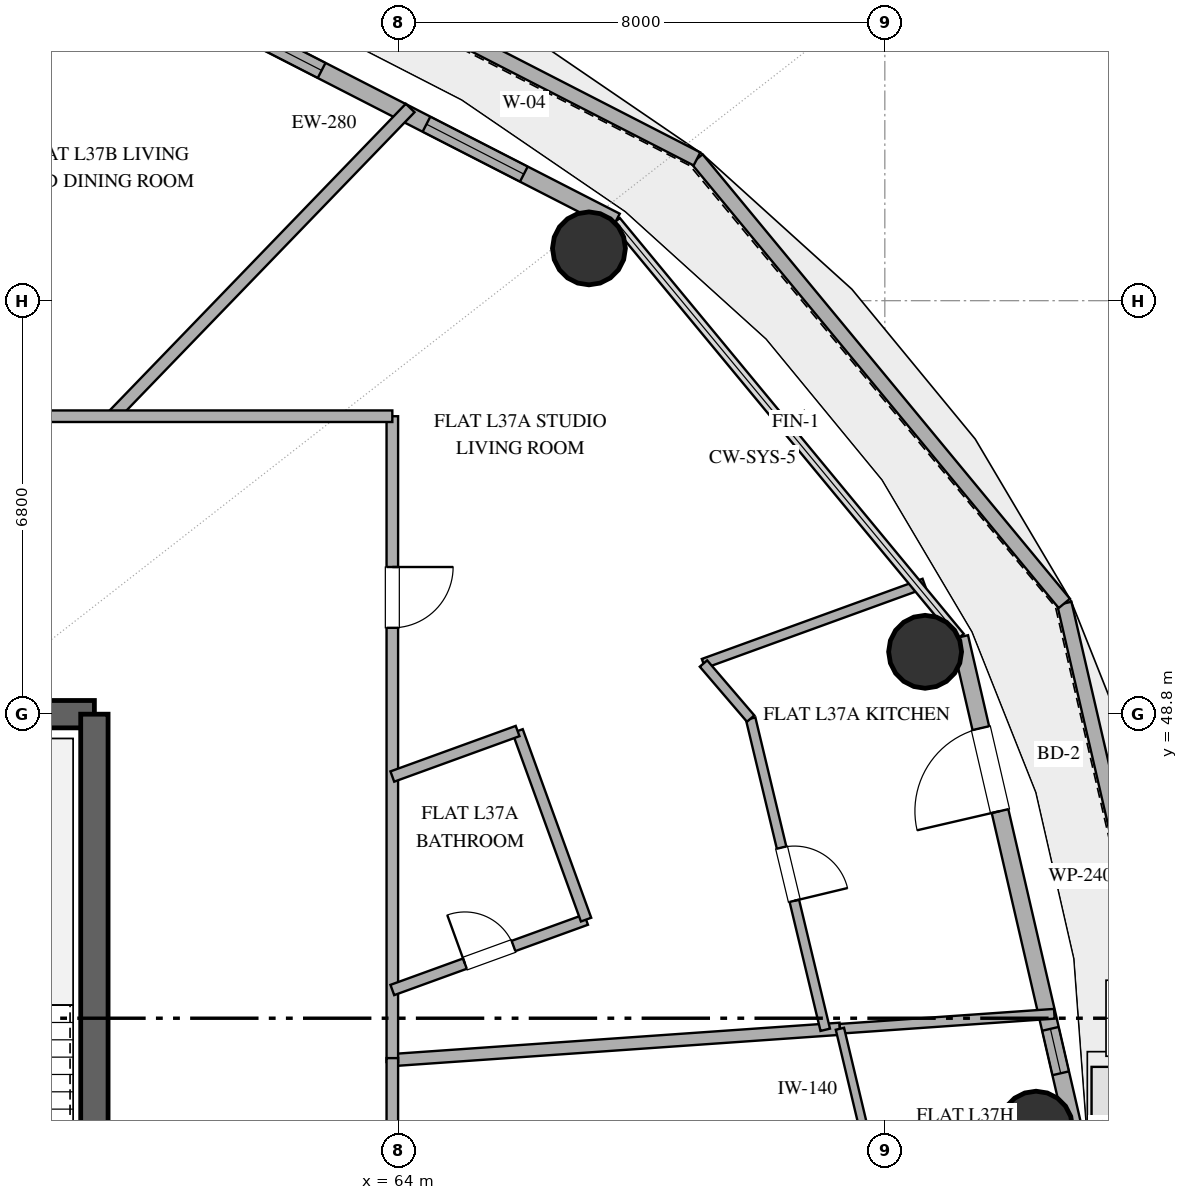
"""IFC4 building model, lengths in metres.
Left out: names, types, materials, properties, quantities, classifications, styles, units other than length and angle.
Written with IfcOpenShell. Run it as: python <this file> out.ifc"""

import sys

from ifc_helpers import new_model, si_unit, direction, frame, frame_2d, origin, origin_2d, place, context, subcontext, project, spatial, rectangle, hollow_circle, extrude, element, fill, save


model = new_model("IFC4")
c1 = context("Model", 3, precision=1e-05, world=origin(), true_north=direction((0.0, 1.0)))
c2 = subcontext(c1, "Body", "Model", "MODEL_VIEW")
j1 = project(units=[si_unit("LENGTHUNIT", "METRE"), si_unit("PLANEANGLEUNIT", "RADIAN")], contexts=[c1])
p1 = place(None, origin())
s1 = spatial("IfcSite", under=j1, at=p1, CompositionType="ELEMENT")
p2 = place(p1, origin())
s2 = spatial("IfcBuilding", under=s1, at=p2, CompositionType="ELEMENT")
p3 = place(p2, frame((0.0, 0.0, 150.6)))
s3 = spatial("IfcBuildingStorey", under=s2, at=p3, CompositionType="ELEMENT", Elevation=150.6)
p4 = place(p3, frame((55.0, 48.8, 0.0), z_axis=(0.0, 0.0, 1.0), x_axis=(1.0, 0.0, 0.0)))
e1 = element("IfcWall", 1, at=p4, inside=s3, PredefinedType="SHEAR", context=c2, shape_type="SweptSolid", body=[
    extrude(rectangle(XDim=4.0, YDim=0.45, at=frame_2d((2.0, 0.0))), origin(), (0.0, 0.0, 1.0), 3.38),
])
p5 = place(p3, frame((59.0, 35.2, 0.0), z_axis=(0.0, 0.0, 1.0), x_axis=(0.0, 1.0, 0.0)))
e2 = element("IfcWall", 2, at=p5, inside=s3, PredefinedType="SHEAR", context=c2, shape_type="SweptSolid", body=[
    extrude(rectangle(XDim=13.6, YDim=0.45, at=frame_2d((6.8, 0.0))), origin(), (0.0, 0.0, 1.0), 3.38),
])
for number, where, z_axis, x_axis in (
    (3, (74.487, 42.0, 0.0), (0.0, 0.0, 1.0), (1.0, 0.0, 0.0)),
    (4, (72.662, 49.826, 0.0), (0.0, 0.0, 1.0), (1.0, 0.0, 0.0)),
    (5, (67.134, 56.46, 0.0), (0.0, 0.0, 1.0), (1.0, 0.0, 0.0)),
):
    element("IfcColumn", number, at=place(p3, frame(where, z_axis=z_axis, x_axis=x_axis)), inside=s3, PredefinedType="COLUMN", context=c2, shape_type="SweptSolid", body=[
        extrude(hollow_circle(Radius=0.6, WallThickness=0.032, at=origin_2d()), origin(), (0.0, 0.0, 1.0), 3.38),
    ])
p6 = place(p3, frame((76.946, 42.0, 0.0), z_axis=(0.0, 0.0, 1.0), x_axis=(-0.225341034137, 0.974279948646, 0.0)))
e6 = element("IfcWall", 6, at=p6, inside=s3, PredefinedType="PARAPET", context=c2, shape_type="SweptSolid", body=[
    extrude(rectangle(XDim=8.849, YDim=0.24, at=frame_2d((4.425, 0.0))), origin(), (0.0, 0.0, 1.0), 1.25),
])
p7 = place(p3, frame((74.952, 50.622, 0.0), z_axis=(0.0, 0.0, 1.0), x_axis=(-0.637107627078, 0.770774851379, 0.0)))
e7 = element("IfcWall", 7, at=p7, inside=s3, PredefinedType="PARAPET", context=c2, shape_type="SweptSolid", body=[
    extrude(rectangle(XDim=9.483, YDim=0.24, at=frame_2d((4.742, 0.0))), origin(), (0.0, 0.0, 1.0), 1.25),
])
p8 = place(p3, frame((68.91, 57.931, 0.0), z_axis=(0.0, 0.0, 1.0), x_axis=(-0.8897661473, 0.456416698992, 0.0)))
e8 = element("IfcWall", 8, at=p8, inside=s3, PredefinedType="PARAPET", context=c2, shape_type="SweptSolid", body=[
    extrude(rectangle(XDim=10.7, YDim=0.24, at=frame_2d((5.35, 0.0))), origin(), (0.0, 0.0, 1.0), 1.25),
])
p9 = place(p3, frame((75.099, 42.0, 0.0), z_axis=(0.0, 0.0, 1.0), x_axis=(-0.225473184558, 0.974249374157, 0.0)))
e9 = element("IfcWall", 9, at=p9, inside=s3, PredefinedType="SOLIDWALL", context=c2, shape_type="SweptSolid", body=[
    extrude(rectangle(XDim=8.28, YDim=0.28, at=frame_2d((4.14, 0.0))), origin(), (0.0, 0.0, 1.0), 3.38),
])
p10 = place(p9, frame((5.344, 0.0, 0.0)))
e10 = element("IfcOpeningElement", 10, at=p10, cuts=e9, PredefinedType="OPENING", context=c2, shape_type="SweptSolid", body=[
    extrude(rectangle(XDim=1.4, YDim=2.2, at=frame_2d((0.7, 1.1))), frame((0.0, 0.15, 0.0), z_axis=(0.0, -1.0, 0.0), x_axis=(1.0, 0.0, 0.0)), (0.0, 0.0, 1.0), 0.3),
])
p11 = place(p9, frame((0.918, 0.0, 0.85)))
e11 = element("IfcOpeningElement", 11, at=p11, cuts=e9, PredefinedType="OPENING", context=c2, shape_type="SweptSolid", body=[
    extrude(rectangle(XDim=0.75, YDim=1.8, at=frame_2d((0.375, 0.9))), frame((0.0, 0.15, 0.0), z_axis=(0.0, -1.0, 0.0), x_axis=(1.0, 0.0, 0.0)), (0.0, 0.0, 1.0), 0.3),
])
p12 = place(p3, frame((67.576, 56.906, 0.0), z_axis=(0.0, 0.0, 1.0), x_axis=(-0.889872523182, 0.456209263919, 0.0)))
e12 = element("IfcWall", 12, at=p12, inside=s3, PredefinedType="SOLIDWALL", context=c2, shape_type="SweptSolid", body=[
    extrude(rectangle(XDim=10.016, YDim=0.28, at=frame_2d((5.008, 0.0))), origin(), (0.0, 0.0, 1.0), 3.38),
])
p13 = place(p12, frame((1.7, 0.0, 0.85)))
e13 = element("IfcOpeningElement", 13, at=p13, cuts=e12, PredefinedType="OPENING", context=c2, shape_type="SweptSolid", body=[
    extrude(rectangle(XDim=1.8, YDim=2.2, at=frame_2d((0.9, 1.1))), frame((0.0, 0.15, 0.0), z_axis=(0.0, -1.0, 0.0), x_axis=(1.0, 0.0, 0.0)), (0.0, 0.0, 1.0), 0.3),
])
p14 = place(p12, frame((5.438, 0.0, 0.85)))
e14 = element("IfcOpeningElement", 14, at=p14, cuts=e12, PredefinedType="OPENING", context=c2, shape_type="SweptSolid", body=[
    extrude(rectangle(XDim=1.8, YDim=2.2, at=frame_2d((0.9, 1.1))), frame((0.0, 0.15, 0.0), z_axis=(0.0, -1.0, 0.0), x_axis=(1.0, 0.0, 0.0)), (0.0, 0.0, 1.0), 0.3),
])
p15 = place(p3, frame((71.261, 43.627, 0.0), z_axis=(0.0, 0.0, 1.0), x_axis=(-0.997562906323, -0.069772830877, 0.0)))
e15 = element("IfcWall", 15, at=p15, inside=s3, PredefinedType="PARTITIONING", context=c2, shape_type="SweptSolid", body=[
    extrude(rectangle(XDim=7.38, YDim=0.2, at=frame_2d((3.69, 0.0))), origin(), (0.0, 0.0, 1.0), 2.74),
])
p16 = place(p3, frame((64.194, 58.769, 0.0), z_axis=(0.0, 0.0, 1.0), x_axis=(-0.694647685064, -0.719350118952, 0.0)))
e16 = element("IfcWall", 16, at=p16, inside=s3, PredefinedType="PARTITIONING", context=c2, shape_type="SweptSolid", body=[
    extrude(rectangle(XDim=7.047, YDim=0.2, at=frame_2d((3.523, 0.0))), origin(), (0.0, 0.0, 1.0), 2.74),
])
p17 = place(p3, frame((63.9, 53.7, 0.0), z_axis=(0.0, 0.0, 1.0), x_axis=(0.0, -1.0, 0.0)))
e17 = element("IfcWall", 17, at=p17, inside=s3, PredefinedType="PARTITIONING", context=c2, shape_type="SweptSolid", body=[
    extrude(rectangle(XDim=10.62, YDim=0.19, at=frame_2d((5.31, 0.0))), origin(), (0.0, 0.0, 1.0), 2.74),
])
p18 = place(p17, frame((2.48, 0.0, 0.0)))
e18 = element("IfcOpeningElement", 18, at=p18, cuts=e17, PredefinedType="OPENING", context=c2, shape_type="SweptSolid", body=[
    extrude(rectangle(XDim=1.0, YDim=2.2, at=frame_2d((0.5, 1.1))), frame((0.0, 0.105, 0.0), z_axis=(0.0, -1.0, 0.0), x_axis=(1.0, 0.0, 0.0)), (0.0, 0.0, 1.0), 0.21),
])
p19 = place(p3, frame((49.612, 53.7, 0.0), z_axis=(0.0, 0.0, 1.0), x_axis=(1.0, 0.0, 0.0)))
e19 = element("IfcWall", 19, at=p19, inside=s3, PredefinedType="PARTITIONING", context=c2, shape_type="SweptSolid", body=[
    extrude(rectangle(XDim=14.288, YDim=0.19, at=frame_2d((7.144, 0.0))), origin(), (0.0, 0.0, 1.0), 2.74),
])
p20 = place(p19, frame((6.395, 0.0, 0.0)))
e20 = element("IfcOpeningElement", 20, at=p20, cuts=e19, PredefinedType="OPENING", context=c2, shape_type="SweptSolid", body=[
    extrude(rectangle(XDim=1.0, YDim=2.2, at=frame_2d((0.5, 1.1))), frame((0.0, 0.105, 0.0), z_axis=(0.0, -1.0, 0.0), x_axis=(1.0, 0.0, 0.0)), (0.0, 0.0, 1.0), 0.21),
])
p21 = place(p3, frame((63.9, 43.144, 0.0), z_axis=(0.0, 0.0, 1.0), x_axis=(0.0, -1.0, 0.0)))
e21 = element("IfcWall", 21, at=p21, inside=s3, PredefinedType="PARTITIONING", context=c2, shape_type="SweptSolid", body=[
    extrude(rectangle(XDim=12.844, YDim=0.19, at=frame_2d((6.422, 0.0))), origin(), (0.0, 0.0, 1.0), 2.74),
])
p22 = place(p21, frame((9.529, 0.0, 0.0)))
e22 = element("IfcOpeningElement", 22, at=p22, cuts=e21, PredefinedType="OPENING", context=c2, shape_type="SweptSolid", body=[
    extrude(rectangle(XDim=1.0, YDim=2.2, at=frame_2d((0.5, 1.1))), frame((0.0, 0.105, 0.0), z_axis=(0.0, -1.0, 0.0), x_axis=(1.0, 0.0, 0.0)), (0.0, 0.0, 1.0), 0.21),
])
p23 = place(p3, frame((69.793, 48.728, 0.0), z_axis=(0.0, 0.0, 1.0), x_axis=(0.23310450522, -0.972451690135, 0.0)))
e23 = element("IfcWall", 23, at=p23, inside=s3, PredefinedType="PLUMBINGWALL", context=c2, shape_type="SweptSolid", body=[
    extrude(rectangle(XDim=5.263, YDim=0.16, at=frame_2d((2.631, 0.0))), origin(), (0.0, 0.0, 1.0), 2.74),
])
p24 = place(p23, frame((2.181, 0.0, 0.0)))
e24 = element("IfcOpeningElement", 24, at=p24, cuts=e23, PredefinedType="OPENING", context=c2, shape_type="SweptSolid", body=[
    extrude(rectangle(XDim=0.9, YDim=2.1, at=frame_2d((0.45, 1.05))), frame((0.0, 0.09, 0.0), z_axis=(0.0, -1.0, 0.0), x_axis=(1.0, 0.0, 0.0)), (0.0, 0.0, 1.0), 0.18),
])
p25 = place(p3, frame((72.647, 50.951, 0.0), z_axis=(0.0, 0.0, 1.0), x_axis=(-0.939926248806, -0.341377572206, 0.0)))
e25 = element("IfcWall", 25, at=p25, inside=s3, PredefinedType="PLUMBINGWALL", context=c2, shape_type="SweptSolid", body=[
    extrude(rectangle(XDim=3.862, YDim=0.16, at=frame_2d((1.931, 0.0))), origin(), (0.0, 0.0, 1.0), 2.74),
])
p26 = place(p3, frame((71.261, 43.627, 0.0), z_axis=(0.0, 0.0, 1.0), x_axis=(0.997563824095, 0.069759707979, 0.0)))
e26 = element("IfcWall", 26, at=p26, inside=s3, PredefinedType="PLUMBINGWALL", context=c2, shape_type="SweptSolid", body=[
    extrude(rectangle(XDim=3.535, YDim=0.16, at=frame_2d((1.767, 0.0))), origin(), (0.0, 0.0, 1.0), 2.74),
])
p27 = place(p3, frame((63.9, 44.264, 0.0), z_axis=(0.0, 0.0, 1.0), x_axis=(0.939936319397, 0.341349843238, 0.0)))
e27 = element("IfcWall", 27, at=p27, inside=s3, PredefinedType="PLUMBINGWALL", context=c2, shape_type="SweptSolid", body=[
    extrude(rectangle(XDim=3.39, YDim=0.18, at=frame_2d((1.695, 0.0))), origin(), (0.0, 0.0, 1.0), 2.74),
])
p28 = place(p27, frame((1.27, 0.0, 0.0)))
e28 = element("IfcOpeningElement", 28, at=p28, cuts=e27, PredefinedType="OPENING", context=c2, shape_type="SweptSolid", body=[
    extrude(rectangle(XDim=0.85, YDim=2.1, at=frame_2d((0.425, 1.05))), frame((0.0, 0.1, 0.0), z_axis=(0.0, -1.0, 0.0), x_axis=(1.0, 0.0, 0.0)), (0.0, 0.0, 1.0), 0.2),
])
p29 = place(p3, frame((67.086, 45.421, 0.0), z_axis=(0.0, 0.0, 1.0), x_axis=(-0.341333094487, 0.93994240175, 0.0)))
e29 = element("IfcWall", 29, at=p29, inside=s3, PredefinedType="PLUMBINGWALL", context=c2, shape_type="SweptSolid", body=[
    extrude(rectangle(XDim=3.3, YDim=0.18, at=frame_2d((1.65, 0.0))), origin(), (0.0, 0.0, 1.0), 2.74),
])
p30 = place(p3, frame((65.96, 48.523, 0.0), z_axis=(0.0, 0.0, 1.0), x_axis=(-0.939962415694, -0.341277976263, 0.0)))
e30 = element("IfcWall", 30, at=p30, inside=s3, PredefinedType="PLUMBINGWALL", context=c2, shape_type="SweptSolid", body=[
    extrude(rectangle(XDim=2.192, YDim=0.18, at=frame_2d((1.096, 0.0))), origin(), (0.0, 0.0, 1.0), 2.74),
])
p31 = place(p3, frame((71.649, 42.0, 0.0), z_axis=(0.0, 0.0, 1.0), x_axis=(-0.231561310927, 0.972820311919, 0.0)))
e31 = element("IfcWall", 31, at=p31, inside=s3, PredefinedType="PARTITIONING", context=c2, shape_type="SweptSolid", body=[
    extrude(rectangle(XDim=1.672, YDim=0.14, at=frame_2d((0.836, 0.0))), origin(), (0.0, 0.0, 1.0), 2.74),
])
p32 = place(p3, frame((69.018, 49.633, 0.0), z_axis=(0.0, 0.0, 1.0), x_axis=(0.650538392346, -0.759473370227, 0.0)))
e32 = element("IfcWall", 32, at=p32, inside=s3, PredefinedType="PLUMBINGWALL", context=c2, shape_type="SweptSolid", body=[
    extrude(rectangle(XDim=1.192, YDim=0.16, at=frame_2d((0.596, 0.0))), origin(), (0.0, 0.0, 1.0), 2.74),
])
p33 = place(p3, origin())
p34 = place(p33, frame((75.95, 42.0, 0.0)))
p35 = place(p34, frame((0.0, 0.0, 0.11)))
e33 = element("IfcDoor", 33, at=p35, inside=s3, OperationType="SINGLE_SWING_LEFT", PredefinedType="TRAPDOOR", context=c2, shape_type="SweptSolid", body=[
    extrude(rectangle(XDim=1.1, YDim=2.0, at=origin_2d()), origin(), (0.0, 0.0, 1.0), 0.05),
])
p36 = place(p10, origin())
e34 = element("IfcDoor", 34, at=p36, inside=s3, OperationType="SINGLE_SWING_LEFT", PredefinedType="DOOR", context=c2, shape_type="SweptSolid", body=[
    extrude(rectangle(XDim=1.4, YDim=2.2, at=frame_2d((0.7, 1.1))), frame((0.0, 0.025, 0.0), z_axis=(0.0, -1.0, 0.0), x_axis=(1.0, 0.0, 0.0)), (0.0, 0.0, 1.0), 0.05),
])
fill(e10, e34)
p37 = place(p13, origin())
e35 = element("IfcWindow", 35, at=p37, inside=s3, PartitioningType="SINGLE_PANEL", PredefinedType="WINDOW", context=c2, shape_type="SweptSolid", body=[
    extrude(rectangle(XDim=1.8, YDim=2.2, at=frame_2d((0.9, 1.1))), frame((0.0, 0.03, 0.0), z_axis=(0.0, -1.0, 0.0), x_axis=(1.0, 0.0, 0.0)), (0.0, 0.0, 1.0), 0.06),
])
fill(e13, e35)
p38 = place(p14, origin())
e36 = element("IfcWindow", 36, at=p38, inside=s3, PartitioningType="SINGLE_PANEL", PredefinedType="WINDOW", context=c2, shape_type="SweptSolid", body=[
    extrude(rectangle(XDim=1.8, YDim=2.2, at=frame_2d((0.9, 1.1))), frame((0.0, 0.03, 0.0), z_axis=(0.0, -1.0, 0.0), x_axis=(1.0, 0.0, 0.0)), (0.0, 0.0, 1.0), 0.06),
])
fill(e14, e36)
p39 = place(p11, origin())
e37 = element("IfcWindow", 37, at=p39, inside=s3, PartitioningType="SINGLE_PANEL", PredefinedType="WINDOW", context=c2, shape_type="SweptSolid", body=[
    extrude(rectangle(XDim=0.75, YDim=1.8, at=frame_2d((0.375, 0.9))), frame((0.0, 0.03, 0.0), z_axis=(0.0, -1.0, 0.0), x_axis=(1.0, 0.0, 0.0)), (0.0, 0.0, 1.0), 0.06),
])
fill(e11, e37)
p40 = place(p18, origin())
e38 = element("IfcDoor", 38, at=p40, inside=s3, OperationType="SINGLE_SWING_LEFT", PredefinedType="DOOR", context=c2, shape_type="SweptSolid", body=[
    extrude(rectangle(XDim=1.0, YDim=2.2, at=frame_2d((0.5, 1.1))), frame((0.0, 0.025, 0.0), z_axis=(0.0, -1.0, 0.0), x_axis=(1.0, 0.0, 0.0)), (0.0, 0.0, 1.0), 0.05),
])
fill(e18, e38)
p41 = place(p24, origin())
e39 = element("IfcDoor", 39, at=p41, inside=s3, OperationType="SINGLE_SWING_RIGHT", PredefinedType="DOOR", context=c2, shape_type="SweptSolid", body=[
    extrude(rectangle(XDim=0.9, YDim=2.1, at=frame_2d((0.45, 1.05))), frame((0.0, 0.025, 0.0), z_axis=(0.0, -1.0, 0.0), x_axis=(1.0, 0.0, 0.0)), (0.0, 0.0, 1.0), 0.05),
])
fill(e24, e39)
p42 = place(p28, origin())
e40 = element("IfcDoor", 40, at=p42, inside=s3, OperationType="SINGLE_SWING_LEFT", PredefinedType="DOOR", context=c2, shape_type="SweptSolid", body=[
    extrude(rectangle(XDim=0.85, YDim=2.1, at=frame_2d((0.425, 1.05))), frame((0.0, 0.025, 0.0), z_axis=(0.0, -1.0, 0.0), x_axis=(1.0, 0.0, 0.0)), (0.0, 0.0, 1.0), 0.05),
])
fill(e28, e40)
save(model, sys.argv[1])
